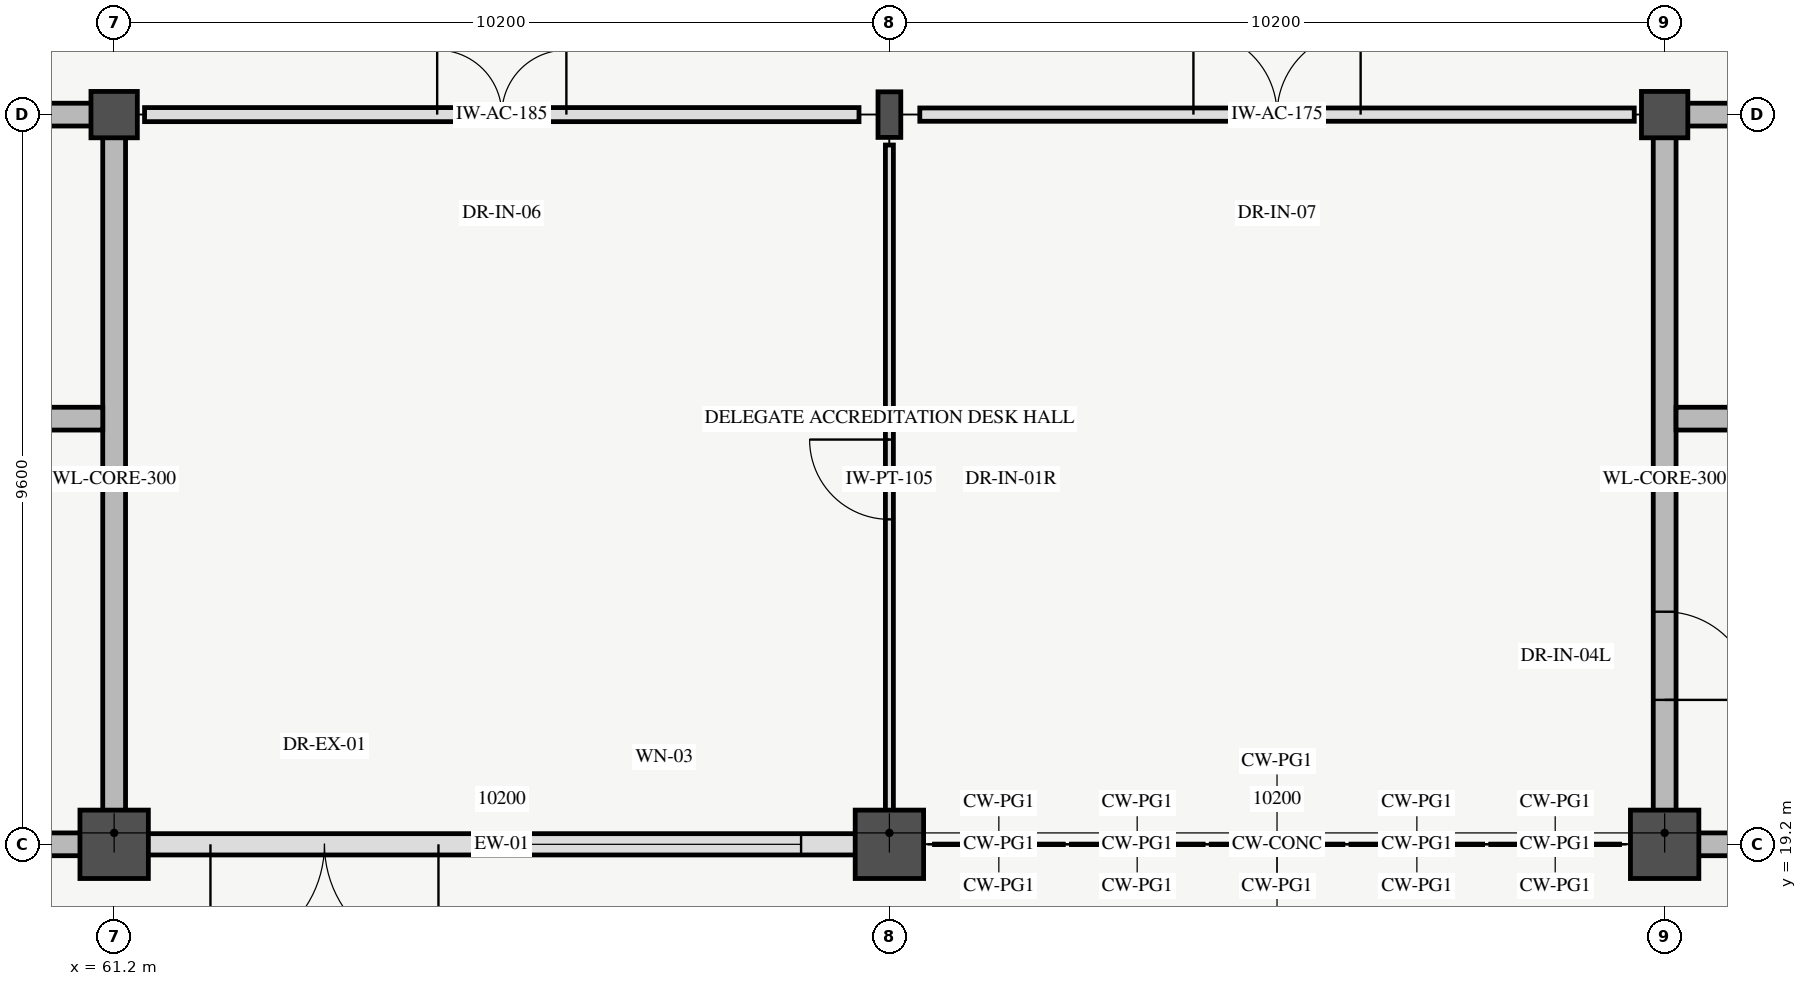
"""IFC4 building model, lengths in metres.
Left out: names, types, materials, properties, quantities, classifications, styles, units other than length and angle.
Written with IfcOpenShell. Run it as: python <this file> out.ifc"""

import sys

from ifc_helpers import new_model, si_unit, direction, frame, frame_2d, origin, origin_2d, place, context, subcontext, project, spatial, rectangle, hollow_circle, i_section, extrude, element, fill, save


model = new_model("IFC4")
c1 = context("Model", 3, precision=1e-05, world=origin(), true_north=direction((0.0, 1.0)))
c2 = subcontext(c1, "Body", "Model", "MODEL_VIEW")
j1 = project(units=[si_unit("LENGTHUNIT", "METRE"), si_unit("PLANEANGLEUNIT", "RADIAN")], contexts=[c1])
p1 = place(None, origin())
s1 = spatial("IfcSite", under=j1, at=p1, CompositionType="ELEMENT")
p2 = place(p1, origin())
s2 = spatial("IfcBuilding", under=s1, at=p2, CompositionType="ELEMENT")
p3 = place(p2, origin())
s3 = spatial("IfcBuildingStorey", under=s2, at=p3, CompositionType="ELEMENT", Elevation=0.0)
p4 = place(p3, frame((61.2, 19.2, 0.0), z_axis=(0.0, 0.0, 1.0), x_axis=(1.0, 0.0, 0.0)))
e1 = element("IfcColumn", 1, at=p4, inside=s3, PredefinedType="COLUMN", context=c2, shape_type="SweptSolid", body=[
    extrude(rectangle(XDim=0.9, YDim=0.9, at=origin_2d()), origin(), (0.0, 0.0, 1.0), 5.4),
])
p5 = place(p3, frame((61.2, 28.8, 0.0), z_axis=(0.0, 0.0, 1.0), x_axis=(1.0, 0.0, 0.0)))
e2 = element("IfcColumn", 2, at=p5, inside=s3, PredefinedType="COLUMN", context=c2, shape_type="SweptSolid", body=[
    extrude(hollow_circle(Radius=0.305, WallThickness=0.025, at=origin_2d()), origin(), (0.0, 0.0, 1.0), 5.4),
])
p6 = place(p3, frame((71.4, 19.2, 0.0), z_axis=(0.0, 0.0, 1.0), x_axis=(1.0, 0.0, 0.0)))
e3 = element("IfcColumn", 3, at=p6, inside=s3, PredefinedType="COLUMN", context=c2, shape_type="SweptSolid", body=[
    extrude(rectangle(XDim=0.9, YDim=0.9, at=origin_2d()), origin(), (0.0, 0.0, 1.0), 5.4),
])
p7 = place(p3, frame((71.4, 28.8, 0.0), z_axis=(0.0, 0.0, 1.0), x_axis=(1.0, 0.0, 0.0)))
e4 = element("IfcColumn", 4, at=p7, inside=s3, PredefinedType="COLUMN", context=c2, shape_type="SweptSolid", body=[
    extrude(i_section(OverallWidth=0.3, OverallDepth=0.6, WebThickness=0.015, FlangeThickness=0.03, FilletRadius=0.027, at=origin_2d()), origin(), (0.0, 0.0, 1.0), 5.4),
])
p8 = place(p3, frame((81.6, 19.2, 0.0), z_axis=(0.0, 0.0, 1.0), x_axis=(1.0, 0.0, 0.0)))
e5 = element("IfcColumn", 5, at=p8, inside=s3, PredefinedType="COLUMN", context=c2, shape_type="SweptSolid", body=[
    extrude(rectangle(XDim=0.9, YDim=0.9, at=origin_2d()), origin(), (0.0, 0.0, 1.0), 5.4),
])
p9 = place(p3, frame((81.6, 28.8, 0.0), z_axis=(0.0, 0.0, 1.0), x_axis=(1.0, 0.0, 0.0)))
e6 = element("IfcColumn", 6, at=p9, inside=s3, PredefinedType="COLUMN", context=c2, shape_type="SweptSolid", body=[
    extrude(hollow_circle(Radius=0.305, WallThickness=0.025, at=origin_2d()), origin(), (0.0, 0.0, 1.0), 5.4),
])
p10 = place(p3, frame((61.44, 19.2, 0.0), z_axis=(0.0, 0.0, 1.0), x_axis=(1.0, 0.0, 0.0)))
e7 = element("IfcWall", 7, at=p10, inside=s3, PredefinedType="STANDARD", context=c2, shape_type="SweptSolid", body=[
    extrude(rectangle(XDim=9.72, YDim=0.28, at=frame_2d((4.86, 0.0))), origin(), (0.0, 0.0, 1.0), 3.68),
])
p11 = place(p10, frame((1.027, 0.0, 0.0)))
e8 = element("IfcOpeningElement", 8, at=p11, cuts=e7, PredefinedType="OPENING", context=c2, shape_type="SweptSolid", body=[
    extrude(rectangle(XDim=3.0, YDim=2.5, at=frame_2d((1.5, 1.25))), frame((0.0, 0.15, 0.0), z_axis=(0.0, -1.0, 0.0), x_axis=(1.0, 0.0, 0.0)), (0.0, 0.0, 1.0), 0.3),
])
p12 = place(p10, frame((5.198, 0.0, 0.85)))
e9 = element("IfcOpeningElement", 9, at=p12, cuts=e7, PredefinedType="OPENING", context=c2, shape_type="SweptSolid", body=[
    extrude(rectangle(XDim=3.6, YDim=2.1, at=frame_2d((1.8, 1.05))), frame((0.0, 0.15, 0.0), z_axis=(0.0, -1.0, 0.0), x_axis=(1.0, 0.0, 0.0)), (0.0, 0.0, 1.0), 0.3),
])
p13 = place(p3, frame((51.0, 19.2, 0.0), z_axis=(0.0, 0.0, 1.0), x_axis=(1.0, 0.0, 0.0)))
e10 = element("IfcWall", 10, at=p13, inside=s3, PredefinedType="SHEAR", context=c2, shape_type="SweptSolid", body=[
    extrude(rectangle(XDim=10.2, YDim=0.3, at=frame_2d((5.1, 0.0))), origin(), (0.0, 0.0, 1.0), 5.4),
])
p14 = place(p13, frame((0.95, 0.0, 0.0)))
e11 = element("IfcOpeningElement", 11, at=p14, cuts=e10, PredefinedType="OPENING", context=c2, shape_type="SweptSolid", body=[
    extrude(rectangle(XDim=1.2, YDim=2.2, at=frame_2d((0.6, 1.1))), frame((0.0, 0.16, 0.0), z_axis=(0.0, -1.0, 0.0), x_axis=(1.0, 0.0, 0.0)), (0.0, 0.0, 1.0), 0.32),
])
p15 = place(p3, frame((51.0, 28.8, 0.0), z_axis=(0.0, 0.0, 1.0), x_axis=(1.0, 0.0, 0.0)))
e12 = element("IfcWall", 12, at=p15, inside=s3, PredefinedType="SHEAR", context=c2, shape_type="SweptSolid", body=[
    extrude(rectangle(XDim=10.2, YDim=0.3, at=frame_2d((5.1, 0.0))), origin(), (0.0, 0.0, 1.0), 5.4),
])
p16 = place(p3, frame((61.2, 19.2, 0.0), z_axis=(0.0, 0.0, 1.0), x_axis=(0.0, 1.0, 0.0)))
e13 = element("IfcWall", 13, at=p16, inside=s3, PredefinedType="SHEAR", context=c2, shape_type="SweptSolid", body=[
    extrude(rectangle(XDim=9.6, YDim=0.3, at=frame_2d((4.8, 0.0))), origin(), (0.0, 0.0, 1.0), 5.4),
])
p17 = place(p3, frame((51.15, 24.8, 0.0), z_axis=(0.0, 0.0, 1.0), x_axis=(1.0, 0.0, 0.0)))
e14 = element("IfcWall", 14, at=p17, inside=s3, PredefinedType="SHEAR", context=c2, shape_type="SweptSolid", body=[
    extrude(rectangle(XDim=9.9, YDim=0.3, at=frame_2d((4.95, 0.0))), origin(), (0.0, 0.0, 1.0), 5.4),
])
p18 = place(p3, frame((81.6, 19.2, 0.0), z_axis=(0.0, 0.0, 1.0), x_axis=(1.0, 0.0, 0.0)))
e15 = element("IfcWall", 15, at=p18, inside=s3, PredefinedType="SHEAR", context=c2, shape_type="SweptSolid", body=[
    extrude(rectangle(XDim=10.2, YDim=0.3, at=frame_2d((5.1, 0.0))), origin(), (0.0, 0.0, 1.0), 5.4),
])
p19 = place(p18, frame((0.95, 0.0, 0.0)))
e16 = element("IfcOpeningElement", 16, at=p19, cuts=e15, PredefinedType="OPENING", context=c2, shape_type="SweptSolid", body=[
    extrude(rectangle(XDim=1.2, YDim=2.2, at=frame_2d((0.6, 1.1))), frame((0.0, 0.16, 0.0), z_axis=(0.0, -1.0, 0.0), x_axis=(1.0, 0.0, 0.0)), (0.0, 0.0, 1.0), 0.32),
])
p20 = place(p3, frame((81.6, 28.8, 0.0), z_axis=(0.0, 0.0, 1.0), x_axis=(1.0, 0.0, 0.0)))
e17 = element("IfcWall", 17, at=p20, inside=s3, PredefinedType="SHEAR", context=c2, shape_type="SweptSolid", body=[
    extrude(rectangle(XDim=10.2, YDim=0.3, at=frame_2d((5.1, 0.0))), origin(), (0.0, 0.0, 1.0), 5.4),
])
p21 = place(p3, frame((81.6, 19.2, 0.0), z_axis=(0.0, 0.0, 1.0), x_axis=(0.0, 1.0, 0.0)))
e18 = element("IfcWall", 18, at=p21, inside=s3, PredefinedType="SHEAR", context=c2, shape_type="SweptSolid", body=[
    extrude(rectangle(XDim=9.6, YDim=0.3, at=frame_2d((4.8, 0.0))), origin(), (0.0, 0.0, 1.0), 5.4),
])
p22 = place(p21, frame((1.9, 0.0, 0.0)))
e19 = element("IfcOpeningElement", 19, at=p22, cuts=e18, PredefinedType="OPENING", context=c2, shape_type="SweptSolid", body=[
    extrude(rectangle(XDim=1.16, YDim=2.2, at=frame_2d((0.58, 1.1))), frame((0.0, 0.16, 0.0), z_axis=(0.0, -1.0, 0.0), x_axis=(1.0, 0.0, 0.0)), (0.0, 0.0, 1.0), 0.32),
])
p23 = place(p3, frame((81.75, 24.8, 0.0), z_axis=(0.0, 0.0, 1.0), x_axis=(1.0, 0.0, 0.0)))
e20 = element("IfcWall", 20, at=p23, inside=s3, PredefinedType="SHEAR", context=c2, shape_type="SweptSolid", body=[
    extrude(rectangle(XDim=9.9, YDim=0.3, at=frame_2d((4.95, 0.0))), origin(), (0.0, 0.0, 1.0), 5.4),
])
p24 = place(p3, frame((61.6, 28.8, 0.0), z_axis=(0.0, 0.0, 1.0), x_axis=(1.0, 0.0, 0.0)))
e21 = element("IfcWall", 21, at=p24, inside=s3, PredefinedType="PARTITIONING", context=c2, shape_type="SweptSolid", body=[
    extrude(rectangle(XDim=9.4, YDim=0.185, at=frame_2d((4.7, 0.0))), origin(), (0.0, 0.0, 1.0), 4.08),
])
p25 = place(p24, frame((3.85, 0.0, 0.0)))
e22 = element("IfcOpeningElement", 22, at=p25, cuts=e21, PredefinedType="OPENING", context=c2, shape_type="SweptSolid", body=[
    extrude(rectangle(XDim=1.7, YDim=2.3, at=frame_2d((0.85, 1.15))), frame((0.0, 0.103, 0.0), z_axis=(0.0, -1.0, 0.0), x_axis=(1.0, 0.0, 0.0)), (0.0, 0.0, 1.0), 0.205),
])
p26 = place(p3, frame((71.8, 28.8, 0.0), z_axis=(0.0, 0.0, 1.0), x_axis=(1.0, 0.0, 0.0)))
e23 = element("IfcWall", 23, at=p26, inside=s3, PredefinedType="PARTITIONING", context=c2, shape_type="SweptSolid", body=[
    extrude(rectangle(XDim=9.4, YDim=0.175, at=frame_2d((4.7, 0.0))), origin(), (0.0, 0.0, 1.0), 4.08),
])
p27 = place(p26, frame((3.6, 0.0, 0.0)))
e24 = element("IfcOpeningElement", 24, at=p27, cuts=e23, PredefinedType="OPENING", context=c2, shape_type="SweptSolid", body=[
    extrude(rectangle(XDim=2.2, YDim=2.35, at=frame_2d((1.1, 1.175))), frame((0.0, 0.097, 0.0), z_axis=(0.0, -1.0, 0.0), x_axis=(1.0, 0.0, 0.0)), (0.0, 0.0, 1.0), 0.195),
])
p28 = place(p3, frame((71.4, 19.6, 0.0), z_axis=(0.0, 0.0, 1.0), x_axis=(0.0, 1.0, 0.0)))
e25 = element("IfcWall", 25, at=p28, inside=s3, PredefinedType="PARTITIONING", context=c2, shape_type="SweptSolid", body=[
    extrude(rectangle(XDim=8.8, YDim=0.105, at=frame_2d((4.4, 0.0))), origin(), (0.0, 0.0, 1.0), 4.08),
])
p29 = place(p28, frame((3.875, 0.0, 0.0)))
e26 = element("IfcOpeningElement", 26, at=p29, cuts=e25, PredefinedType="OPENING", context=c2, shape_type="SweptSolid", body=[
    extrude(rectangle(XDim=1.05, YDim=2.15, at=frame_2d((0.525, 1.075))), frame((0.0, 0.062, 0.0), z_axis=(0.0, -1.0, 0.0), x_axis=(1.0, 0.0, 0.0)), (0.0, 0.0, 1.0), 0.125),
])
p30 = place(p11, frame((3.0, 0.0, 0.0), z_axis=(0.0, 0.0, 1.0), x_axis=(-1.0, 0.0, 0.0)))
e27 = element("IfcDoor", 27, at=p30, inside=s3, OperationType="DOUBLE_DOOR_SINGLE_SWING", PredefinedType="DOOR", context=c2, shape_type="SweptSolid", body=[
    extrude(rectangle(XDim=3.0, YDim=2.5, at=frame_2d((1.5, 1.25))), frame((0.0, 0.025, 0.0), z_axis=(0.0, -1.0, 0.0), x_axis=(1.0, 0.0, 0.0)), (0.0, 0.0, 1.0), 0.05),
])
fill(e8, e27)
p31 = place(p12, origin())
e28 = element("IfcWindow", 28, at=p31, inside=s3, PartitioningType="TRIPLE_PANEL_VERTICAL", PredefinedType="WINDOW", context=c2, shape_type="SweptSolid", body=[
    extrude(rectangle(XDim=3.6, YDim=2.1, at=frame_2d((1.8, 1.05))), frame((0.0, 0.03, 0.0), z_axis=(0.0, -1.0, 0.0), x_axis=(1.0, 0.0, 0.0)), (0.0, 0.0, 1.0), 0.06),
])
fill(e9, e28)
p32 = place(p22, origin())
e29 = element("IfcDoor", 29, at=p32, inside=s3, OperationType="SINGLE_SWING_LEFT", PredefinedType="DOOR", context=c2, shape_type="SweptSolid", body=[
    extrude(rectangle(XDim=1.16, YDim=2.2, at=frame_2d((0.58, 1.1))), frame((0.0, 0.025, 0.0), z_axis=(0.0, -1.0, 0.0), x_axis=(1.0, 0.0, 0.0)), (0.0, 0.0, 1.0), 0.05),
])
fill(e19, e29)
p33 = place(p25, origin())
e30 = element("IfcDoor", 30, at=p33, inside=s3, OperationType="DOUBLE_DOOR_SINGLE_SWING", PredefinedType="DOOR", context=c2, shape_type="SweptSolid", body=[
    extrude(rectangle(XDim=1.7, YDim=2.3, at=frame_2d((0.85, 1.15))), frame((0.0, 0.025, 0.0), z_axis=(0.0, -1.0, 0.0), x_axis=(1.0, 0.0, 0.0)), (0.0, 0.0, 1.0), 0.05),
])
fill(e22, e30)
p34 = place(p27, origin())
e31 = element("IfcDoor", 31, at=p34, inside=s3, OperationType="DOUBLE_DOOR_SINGLE_SWING", PredefinedType="DOOR", context=c2, shape_type="SweptSolid", body=[
    extrude(rectangle(XDim=2.2, YDim=2.35, at=frame_2d((1.1, 1.175))), frame((0.0, 0.025, 0.0), z_axis=(0.0, -1.0, 0.0), x_axis=(1.0, 0.0, 0.0)), (0.0, 0.0, 1.0), 0.05),
])
fill(e24, e31)
p35 = place(p29, origin())
e32 = element("IfcDoor", 32, at=p35, inside=s3, OperationType="SINGLE_SWING_RIGHT", PredefinedType="DOOR", context=c2, shape_type="SweptSolid", body=[
    extrude(rectangle(XDim=1.05, YDim=2.15, at=frame_2d((0.525, 1.075))), frame((0.0, 0.025, 0.0), z_axis=(0.0, -1.0, 0.0), x_axis=(1.0, 0.0, 0.0)), (0.0, 0.0, 1.0), 0.05),
])
fill(e26, e32)
save(model, sys.argv[1])
